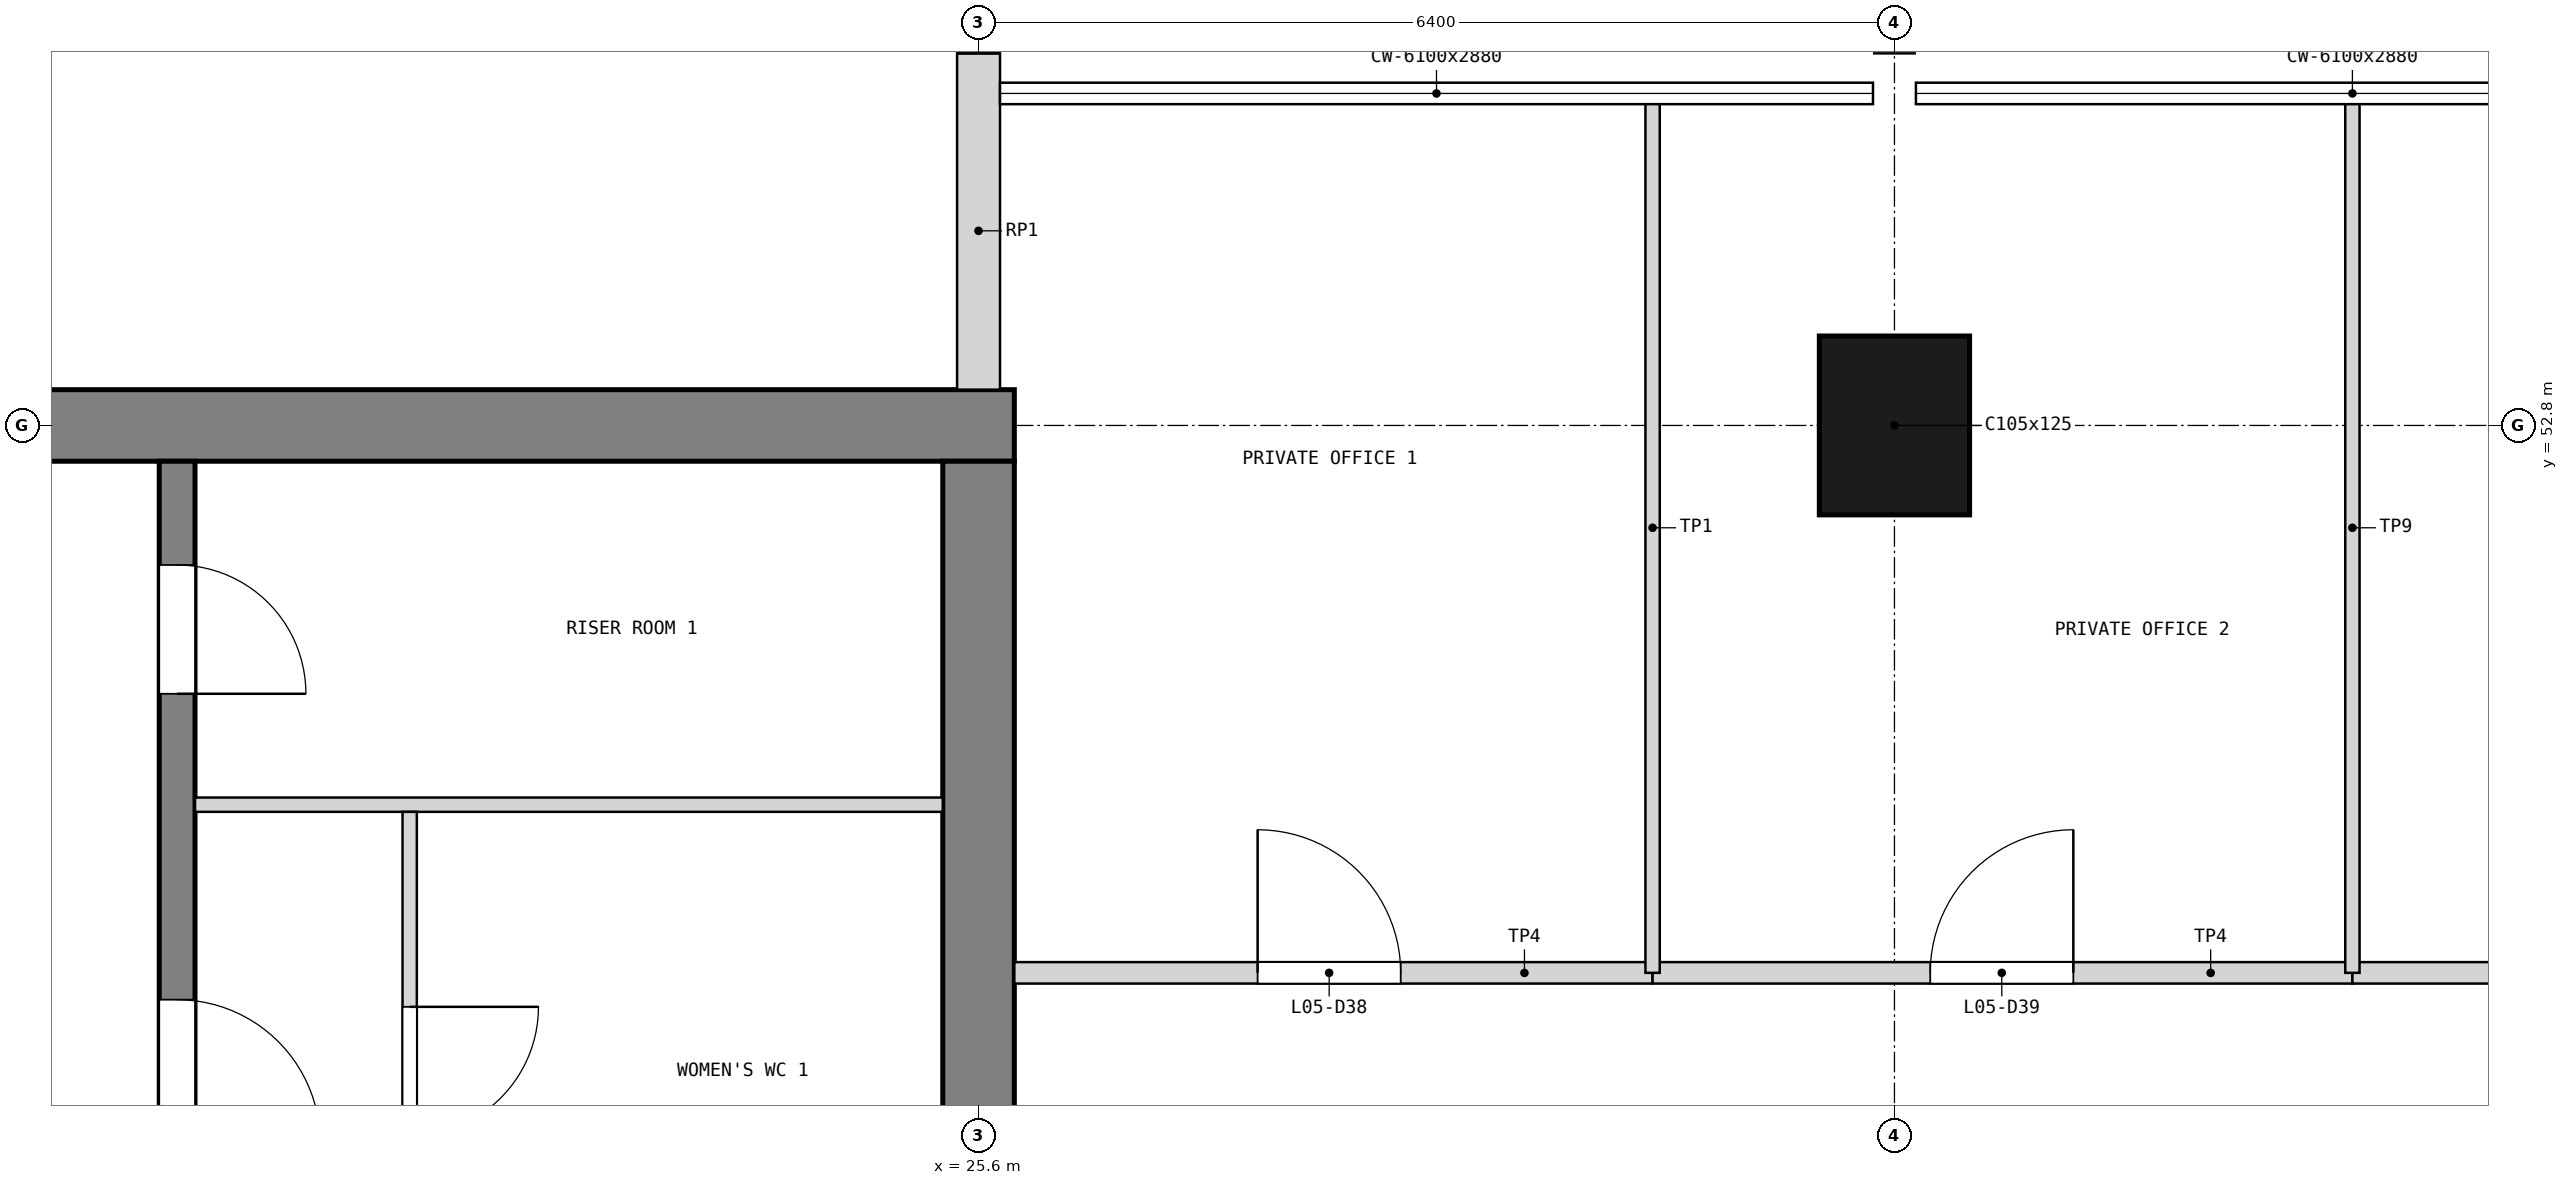
"""IFC4 building model, lengths in metres.
Left out: names, types, materials, properties, quantities, classifications, styles, units other than length and angle.
Written with IfcOpenShell. Run it as: python <this file> out.ifc"""

import sys

from ifc_helpers import new_model, si_unit, direction, frame, frame_2d, origin, origin_2d, place, context, subcontext, project, spatial, rectangle, extrude, element, fill, save


model = new_model("IFC4")
c1 = context("Model", 3, precision=1e-05, world=origin(), true_north=direction((0.0, 1.0)))
c2 = subcontext(c1, "Body", "Model", "MODEL_VIEW")
j1 = project(units=[si_unit("LENGTHUNIT", "METRE"), si_unit("PLANEANGLEUNIT", "RADIAN")], contexts=[c1])
p1 = place(None, origin())
s1 = spatial("IfcSite", under=j1, at=p1, CompositionType="ELEMENT")
p2 = place(p1, origin())
s2 = spatial("IfcBuilding", under=s1, at=p2, CompositionType="ELEMENT")
p3 = place(p2, frame((0.0, 0.0, 21.0)))
s3 = spatial("IfcBuildingStorey", under=s2, at=p3, CompositionType="ELEMENT", Elevation=21.0)
p4 = place(p3, frame((12.55, 52.8, 0.0), z_axis=(0.0, 0.0, 1.0), x_axis=(1.0, 0.0, 0.0)))
e1 = element("IfcWall", 1, at=p4, inside=s3, PredefinedType="SHEAR", context=c2, shape_type="SweptSolid", body=[
    extrude(rectangle(XDim=13.3, YDim=0.5, at=frame_2d((6.65, 0.0))), origin(), (0.0, 0.0, 1.0), 3.9),
])
p5 = place(p4, frame((1.85, 0.0, 1.0)))
e2 = element("IfcOpeningElement", 2, at=p5, cuts=e1, PredefinedType="OPENING", context=c2, shape_type="SweptSolid", body=[
    extrude(rectangle(XDim=0.4, YDim=2.0, at=frame_2d((0.2, 1.0))), frame((0.0, 0.26, 0.0), z_axis=(0.0, -1.0, 0.0), x_axis=(1.0, 0.0, 0.0)), (0.0, 0.0, 1.0), 0.52),
])
p6 = place(p3, frame((25.6, 33.85, 0.0), z_axis=(0.0, 0.0, 1.0), x_axis=(0.0, 1.0, 0.0)))
e3 = element("IfcWall", 3, at=p6, inside=s3, PredefinedType="SHEAR", context=c2, shape_type="SweptSolid", body=[
    extrude(rectangle(XDim=18.7, YDim=0.5, at=frame_2d((9.35, 0.0))), origin(), (0.0, 0.0, 1.0), 3.9),
])
p7 = place(p6, frame((8.35, 0.0, 0.0)))
e4 = element("IfcOpeningElement", 4, at=p7, cuts=e3, PredefinedType="OPENING", context=c2, shape_type="SweptSolid", body=[
    extrude(rectangle(XDim=2.0, YDim=2.1, at=frame_2d((1.0, 1.05))), frame((0.0, 0.26, 0.0), z_axis=(0.0, -1.0, 0.0), x_axis=(1.0, 0.0, 0.0)), (0.0, 0.0, 1.0), 0.52),
])
p8 = place(p3, frame((32.0, 52.8, 0.0), z_axis=(0.0, 0.0, 1.0), x_axis=(1.0, 0.0, 0.0)))
e5 = element("IfcColumn", 5, at=p8, inside=s3, PredefinedType="COLUMN", context=c2, shape_type="SweptSolid", body=[
    extrude(rectangle(XDim=1.05, YDim=1.25, at=origin_2d()), origin(), (0.0, 0.0, 1.0), 3.9),
])
p9 = place(p3, frame((25.6, 53.05, 0.0), z_axis=(0.0, 0.0, 1.0), x_axis=(0.0, 1.0, 0.0)))
e6 = element("IfcWall", 6, at=p9, inside=s3, PredefinedType="SOLIDWALL", context=c2, shape_type="SweptSolid", body=[
    extrude(rectangle(XDim=2.35, YDim=0.3, at=frame_2d((1.175, 0.0))), origin(), (0.0, 0.0, 1.0), 2.88),
])
p10 = place(p3, frame((20.0, 46.475, 0.0), z_axis=(0.0, 0.0, 1.0), x_axis=(0.0, 1.0, 0.0)))
e7 = element("IfcWall", 7, at=p10, inside=s3, PredefinedType="SOLIDWALL", context=c2, shape_type="SweptSolid", body=[
    extrude(rectangle(XDim=6.075, YDim=0.25, at=frame_2d((3.038, 0.0))), origin(), (0.0, 0.0, 1.0), 3.6),
])
p11 = place(p10, frame((1.312, 0.0, 0.0)))
e8 = element("IfcOpeningElement", 8, at=p11, cuts=e7, PredefinedType="OPENING", context=c2, shape_type="SweptSolid", body=[
    extrude(rectangle(XDim=1.0, YDim=2.1, at=frame_2d((0.5, 1.05))), frame((0.0, 0.135, 0.0), z_axis=(0.0, -1.0, 0.0), x_axis=(1.0, 0.0, 0.0)), (0.0, 0.0, 1.0), 0.27),
])
p12 = place(p10, frame((4.45, 0.0, 0.0)))
e9 = element("IfcOpeningElement", 9, at=p12, cuts=e7, PredefinedType="OPENING", context=c2, shape_type="SweptSolid", body=[
    extrude(rectangle(XDim=0.9, YDim=2.1, at=frame_2d((0.45, 1.05))), frame((0.0, 0.135, 0.0), z_axis=(0.0, -1.0, 0.0), x_axis=(1.0, 0.0, 0.0)), (0.0, 0.0, 1.0), 0.27),
])
p13 = place(p3, frame((20.125, 50.15, 0.0), z_axis=(0.0, 0.0, 1.0), x_axis=(1.0, 0.0, 0.0)))
e10 = element("IfcWall", 10, at=p13, inside=s3, PredefinedType="PARTITIONING", context=c2, shape_type="SweptSolid", body=[
    extrude(rectangle(XDim=5.225, YDim=0.1, at=frame_2d((2.613, 0.0))), origin(), (0.0, 0.0, 1.0), 3.6),
])
p14 = place(p3, frame((21.625, 46.475, 0.0), z_axis=(0.0, 0.0, 1.0), x_axis=(0.0, 1.0, 0.0)))
e11 = element("IfcWall", 11, at=p14, inside=s3, PredefinedType="PARTITIONING", context=c2, shape_type="SweptSolid", body=[
    extrude(rectangle(XDim=3.625, YDim=0.1, at=frame_2d((1.812, 0.0))), origin(), (0.0, 0.0, 1.0), 3.6),
])
p15 = place(p14, frame((1.363, 0.0, 0.0)))
e12 = element("IfcOpeningElement", 12, at=p15, cuts=e11, PredefinedType="OPENING", context=c2, shape_type="SweptSolid", body=[
    extrude(rectangle(XDim=0.9, YDim=2.1, at=frame_2d((0.45, 1.05))), frame((0.0, 0.06, 0.0), z_axis=(0.0, -1.0, 0.0), x_axis=(1.0, 0.0, 0.0)), (0.0, 0.0, 1.0), 0.12),
])
p16 = place(p3, frame((25.85, 48.975, 0.0), z_axis=(0.0, 0.0, 1.0), x_axis=(1.0, 0.0, 0.0)))
e13 = element("IfcWall", 13, at=p16, inside=s3, PredefinedType="PARTITIONING", context=c2, shape_type="SweptSolid", body=[
    extrude(rectangle(XDim=4.46, YDim=0.15, at=frame_2d((2.23, 0.0))), origin(), (0.0, 0.0, 1.0), 3.68),
])
p17 = place(p16, frame((1.7, 0.0, 0.0)))
e14 = element("IfcOpeningElement", 14, at=p17, cuts=e13, PredefinedType="OPENING", context=c2, shape_type="SweptSolid", body=[
    extrude(rectangle(XDim=1.0, YDim=2.1, at=frame_2d((0.5, 1.05))), frame((0.0, 0.085, 0.0), z_axis=(0.0, -1.0, 0.0), x_axis=(1.0, 0.0, 0.0)), (0.0, 0.0, 1.0), 0.17),
])
p18 = place(p3, frame((30.31, 48.975, 0.0), z_axis=(0.0, 0.0, 1.0), x_axis=(1.0, 0.0, 0.0)))
e15 = element("IfcWall", 15, at=p18, inside=s3, PredefinedType="PARTITIONING", context=c2, shape_type="SweptSolid", body=[
    extrude(rectangle(XDim=4.89, YDim=0.15, at=frame_2d((2.445, 0.0))), origin(), (0.0, 0.0, 1.0), 3.68),
])
p19 = place(p18, frame((1.94, 0.0, 0.0)))
e16 = element("IfcOpeningElement", 16, at=p19, cuts=e15, PredefinedType="OPENING", context=c2, shape_type="SweptSolid", body=[
    extrude(rectangle(XDim=1.0, YDim=2.1, at=frame_2d((0.5, 1.05))), frame((0.0, 0.085, 0.0), z_axis=(0.0, -1.0, 0.0), x_axis=(1.0, 0.0, 0.0)), (0.0, 0.0, 1.0), 0.17),
])
p20 = place(p3, frame((35.2, 48.975, 0.0), z_axis=(0.0, 0.0, 1.0), x_axis=(1.0, 0.0, 0.0)))
e17 = element("IfcWall", 17, at=p20, inside=s3, PredefinedType="PARTITIONING", context=c2, shape_type="SweptSolid", body=[
    extrude(rectangle(XDim=9.42, YDim=0.15, at=frame_2d((4.71, 0.0))), origin(), (0.0, 0.0, 1.0), 3.68),
])
p21 = place(p20, frame((3.8, 0.0, 0.0)))
e18 = element("IfcOpeningElement", 18, at=p21, cuts=e17, PredefinedType="OPENING", context=c2, shape_type="SweptSolid", body=[
    extrude(rectangle(XDim=1.8, YDim=2.1, at=frame_2d((0.9, 1.05))), frame((0.0, 0.085, 0.0), z_axis=(0.0, -1.0, 0.0), x_axis=(1.0, 0.0, 0.0)), (0.0, 0.0, 1.0), 0.17),
])
p22 = place(p3, frame((30.31, 48.975, 0.0), z_axis=(0.0, 0.0, 1.0), x_axis=(0.0, 1.0, 0.0)))
e19 = element("IfcWall", 19, at=p22, inside=s3, PredefinedType="PARTITIONING", context=c2, shape_type="SweptSolid", body=[
    extrude(rectangle(XDim=6.125, YDim=0.1, at=frame_2d((3.062, 0.0))), origin(), (0.0, 0.0, 1.0), 3.68),
])
p23 = place(p3, frame((35.2, 48.975, 0.0), z_axis=(0.0, 0.0, 1.0), x_axis=(0.0, 1.0, 0.0)))
e20 = element("IfcWall", 20, at=p23, inside=s3, PredefinedType="PARTITIONING", context=c2, shape_type="SweptSolid", body=[
    extrude(rectangle(XDim=6.125, YDim=0.1, at=frame_2d((3.062, 0.0))), origin(), (0.0, 0.0, 1.0), 3.08),
])
p24 = place(p11, frame((1.0, 0.0, 0.0), z_axis=(0.0, 0.0, 1.0), x_axis=(-1.0, 0.0, 0.0)))
e21 = element("IfcDoor", 21, at=p24, inside=s3, OperationType="SINGLE_SWING_RIGHT", PredefinedType="DOOR", context=c2, shape_type="SweptSolid", body=[
    extrude(rectangle(XDim=1.0, YDim=2.1, at=frame_2d((0.5, 1.05))), frame((0.0, 0.025, 0.0), z_axis=(0.0, -1.0, 0.0), x_axis=(1.0, 0.0, 0.0)), (0.0, 0.0, 1.0), 0.05),
])
fill(e8, e21)
p25 = place(p15, frame((0.9, 0.0, 0.0), z_axis=(0.0, 0.0, 1.0), x_axis=(-1.0, 0.0, 0.0)))
e22 = element("IfcDoor", 22, at=p25, inside=s3, OperationType="SINGLE_SWING_LEFT", PredefinedType="DOOR", context=c2, shape_type="SweptSolid", body=[
    extrude(rectangle(XDim=0.9, YDim=2.1, at=frame_2d((0.45, 1.05))), frame((0.0, 0.025, 0.0), z_axis=(0.0, -1.0, 0.0), x_axis=(1.0, 0.0, 0.0)), (0.0, 0.0, 1.0), 0.05),
])
fill(e12, e22)
p26 = place(p12, frame((0.9, 0.0, 0.0), z_axis=(0.0, 0.0, 1.0), x_axis=(-1.0, 0.0, 0.0)))
e23 = element("IfcDoor", 23, at=p26, inside=s3, OperationType="SINGLE_SWING_RIGHT", PredefinedType="DOOR", context=c2, shape_type="SweptSolid", body=[
    extrude(rectangle(XDim=0.9, YDim=2.1, at=frame_2d((0.45, 1.05))), frame((0.0, 0.025, 0.0), z_axis=(0.0, -1.0, 0.0), x_axis=(1.0, 0.0, 0.0)), (0.0, 0.0, 1.0), 0.05),
])
fill(e9, e23)
p27 = place(p17, origin())
e24 = element("IfcDoor", 24, at=p27, inside=s3, OperationType="SINGLE_SWING_LEFT", PredefinedType="DOOR", context=c2, shape_type="SweptSolid", body=[
    extrude(rectangle(XDim=1.0, YDim=2.1, at=frame_2d((0.5, 1.05))), frame((0.0, 0.025, 0.0), z_axis=(0.0, -1.0, 0.0), x_axis=(1.0, 0.0, 0.0)), (0.0, 0.0, 1.0), 0.05),
])
fill(e14, e24)
p28 = place(p19, origin())
e25 = element("IfcDoor", 25, at=p28, inside=s3, OperationType="SINGLE_SWING_RIGHT", PredefinedType="DOOR", context=c2, shape_type="SweptSolid", body=[
    extrude(rectangle(XDim=1.0, YDim=2.1, at=frame_2d((0.5, 1.05))), frame((0.0, 0.025, 0.0), z_axis=(0.0, -1.0, 0.0), x_axis=(1.0, 0.0, 0.0)), (0.0, 0.0, 1.0), 0.05),
])
fill(e16, e25)
save(model, sys.argv[1])
